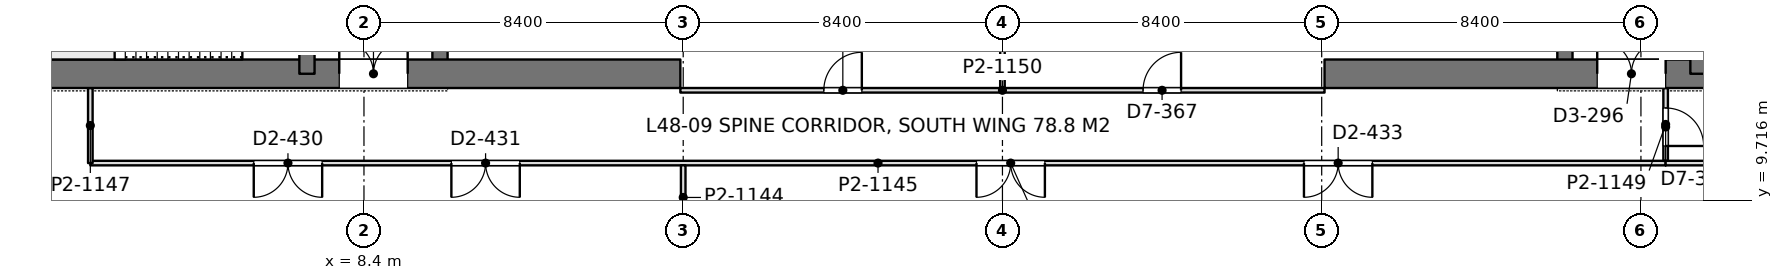
"""IFC4 building model, lengths in metres.
Left out: names, types, materials, properties, quantities, classifications, styles, units other than length and angle.
Written with IfcOpenShell. Run it as: python <this file> out.ifc"""

import sys

from ifc_helpers import new_model, si_unit, direction, frame, frame_2d, origin, place, context, subcontext, project, spatial, rectangle, extrude, element, fill, save


model = new_model("IFC4")
c1 = context("Model", 3, precision=1e-05, world=origin(), true_north=direction((0.0, 1.0)))
c2 = subcontext(c1, "Body", "Model", "MODEL_VIEW")
j1 = project(units=[si_unit("LENGTHUNIT", "METRE"), si_unit("PLANEANGLEUNIT", "RADIAN")], contexts=[c1])
p1 = place(None, origin())
s1 = spatial("IfcSite", under=j1, at=p1, CompositionType="ELEMENT")
p2 = place(p1, origin())
s2 = spatial("IfcBuilding", under=s1, at=p2, CompositionType="ELEMENT")
p3 = place(p2, frame((0.0, 0.0, 211.2)))
s3 = spatial("IfcBuildingStorey", under=s2, at=p3, CompositionType="ELEMENT", Elevation=211.2)
p4 = place(p3, frame((-1.125, 13.05, 0.0), z_axis=(0.0, 0.0, 1.0), x_axis=(1.0, 0.0, 0.0)))
e1 = element("IfcWall", 1, at=p4, inside=s3, PredefinedType="SHEAR", context=c2, shape_type="SweptSolid", body=[
    extrude(rectangle(XDim=17.85, YDim=0.75, at=frame_2d((8.925, 0.0))), origin(), (0.0, 0.0, 1.0), 4.2),
])
p5 = place(p4, frame((8.875, 0.0, 0.0)))
e2 = element("IfcOpeningElement", 2, at=p5, cuts=e1, PredefinedType="OPENING", context=c2, shape_type="SweptSolid", body=[
    extrude(rectangle(XDim=1.8, YDim=2.4, at=frame_2d((0.9, 1.2))), frame((0.0, 0.385, 0.0), z_axis=(0.0, -1.0, 0.0), x_axis=(1.0, 0.0, 0.0)), (0.0, 0.0, 1.0), 0.77),
])
p6 = place(p3, frame((6.9, 13.05, 0.0), z_axis=(0.0, 0.0, 1.0), x_axis=(0.0, 1.0, 0.0)))
e3 = element("IfcWall", 3, at=p6, inside=s3, PredefinedType="SHEAR", context=c2, shape_type="SweptSolid", body=[
    extrude(rectangle(XDim=24.3, YDim=0.4, at=frame_2d((12.15, 0.0))), origin(), (0.0, 0.0, 1.0), 4.2),
])
p7 = place(p6, frame((1.3, 0.0, 0.0)))
e4 = element("IfcOpeningElement", 4, at=p7, cuts=e3, PredefinedType="OPENING", context=c2, shape_type="SweptSolid", body=[
    extrude(rectangle(XDim=1.0, YDim=2.2, at=frame_2d((0.5, 1.1))), frame((0.0, 0.21, 0.0), z_axis=(0.0, -1.0, 0.0), x_axis=(1.0, 0.0, 0.0)), (0.0, 0.0, 1.0), 0.42),
])
p8 = place(p6, frame((22.0, 0.0, 0.0)))
e5 = element("IfcOpeningElement", 5, at=p8, cuts=e3, PredefinedType="OPENING", context=c2, shape_type="SweptSolid", body=[
    extrude(rectangle(XDim=1.0, YDim=2.2, at=frame_2d((0.5, 1.1))), frame((0.0, 0.21, 0.0), z_axis=(0.0, -1.0, 0.0), x_axis=(1.0, 0.0, 0.0)), (0.0, 0.0, 1.0), 0.42),
])
p9 = place(p6, frame((5.55, 0.0, 0.0)))
e6 = element("IfcOpeningElement", 6, at=p9, cuts=e3, PredefinedType="OPENING", context=c2, shape_type="SweptSolid", body=[
    extrude(rectangle(XDim=1.0, YDim=2.2, at=frame_2d((0.5, 1.1))), frame((0.0, 0.21, 0.0), z_axis=(0.0, -1.0, 0.0), x_axis=(1.0, 0.0, 0.0)), (0.0, 0.0, 1.0), 0.42),
])
p10 = place(p6, frame((9.55, 0.0, 0.0)))
e7 = element("IfcOpeningElement", 7, at=p10, cuts=e3, PredefinedType="OPENING", context=c2, shape_type="SweptSolid", body=[
    extrude(rectangle(XDim=1.0, YDim=2.2, at=frame_2d((0.5, 1.1))), frame((0.0, 0.21, 0.0), z_axis=(0.0, -1.0, 0.0), x_axis=(1.0, 0.0, 0.0)), (0.0, 0.0, 1.0), 0.42),
])
p11 = place(p6, frame((12.8, 0.0, 0.0)))
e8 = element("IfcOpeningElement", 8, at=p11, cuts=e3, PredefinedType="OPENING", context=c2, shape_type="SweptSolid", body=[
    extrude(rectangle(XDim=1.1, YDim=2.2, at=frame_2d((0.55, 1.1))), frame((0.0, 0.21, 0.0), z_axis=(0.0, -1.0, 0.0), x_axis=(1.0, 0.0, 0.0)), (0.0, 0.0, 1.0), 0.42),
])
p12 = place(p6, frame((15.538, 0.0, 0.0)))
e9 = element("IfcOpeningElement", 9, at=p12, cuts=e3, PredefinedType="OPENING", context=c2, shape_type="SweptSolid", body=[
    extrude(rectangle(XDim=1.1, YDim=2.2, at=frame_2d((0.55, 1.1))), frame((0.0, 0.21, 0.0), z_axis=(0.0, -1.0, 0.0), x_axis=(1.0, 0.0, 0.0)), (0.0, 0.0, 1.0), 0.42),
])
p13 = place(p6, frame((18.262, 0.0, 0.0)))
e10 = element("IfcOpeningElement", 10, at=p13, cuts=e3, PredefinedType="OPENING", context=c2, shape_type="SweptSolid", body=[
    extrude(rectangle(XDim=1.1, YDim=2.2, at=frame_2d((0.55, 1.1))), frame((0.0, 0.21, 0.0), z_axis=(0.0, -1.0, 0.0), x_axis=(1.0, 0.0, 0.0)), (0.0, 0.0, 1.0), 0.42),
])
p14 = place(p3, frame((10.4, 13.05, 0.0), z_axis=(0.0, 0.0, 1.0), x_axis=(0.0, 1.0, 0.0)))
e11 = element("IfcWall", 11, at=p14, inside=s3, PredefinedType="SHEAR", context=c2, shape_type="SweptSolid", body=[
    extrude(rectangle(XDim=24.3, YDim=0.4, at=frame_2d((12.15, 0.0))), origin(), (0.0, 0.0, 1.0), 4.2),
])
p15 = place(p14, frame((15.75, 0.0, 0.0)))
e12 = element("IfcOpeningElement", 12, at=p15, cuts=e11, PredefinedType="OPENING", context=c2, shape_type="SweptSolid", body=[
    extrude(rectangle(XDim=1.1, YDim=2.2, at=frame_2d((0.55, 1.1))), frame((0.0, 0.21, 0.0), z_axis=(0.0, -1.0, 0.0), x_axis=(1.0, 0.0, 0.0)), (0.0, 0.0, 1.0), 0.42),
])
p16 = place(p14, frame((18.6, 0.0, 0.0)))
e13 = element("IfcOpeningElement", 13, at=p16, cuts=e11, PredefinedType="OPENING", context=c2, shape_type="SweptSolid", body=[
    extrude(rectangle(XDim=1.1, YDim=2.2, at=frame_2d((0.55, 1.1))), frame((0.0, 0.21, 0.0), z_axis=(0.0, -1.0, 0.0), x_axis=(1.0, 0.0, 0.0)), (0.0, 0.0, 1.0), 0.42),
])
p17 = place(p14, frame((21.45, 0.0, 0.0)))
e14 = element("IfcOpeningElement", 14, at=p17, cuts=e11, PredefinedType="OPENING", context=c2, shape_type="SweptSolid", body=[
    extrude(rectangle(XDim=1.1, YDim=2.2, at=frame_2d((0.55, 1.1))), frame((0.0, 0.21, 0.0), z_axis=(0.0, -1.0, 0.0), x_axis=(1.0, 0.0, 0.0)), (0.0, 0.0, 1.0), 0.42),
])
p18 = place(p14, frame((6.05, 0.0, 0.0)))
e15 = element("IfcOpeningElement", 15, at=p18, cuts=e11, PredefinedType="OPENING", context=c2, shape_type="SweptSolid", body=[
    extrude(rectangle(XDim=1.8, YDim=2.4, at=frame_2d((0.9, 1.2))), frame((0.0, 0.21, 0.0), z_axis=(0.0, -1.0, 0.0), x_axis=(1.0, 0.0, 0.0)), (0.0, 0.0, 1.0), 0.42),
])
p19 = place(p14, frame((11.25, 0.0, 0.0)))
e16 = element("IfcOpeningElement", 16, at=p19, cuts=e11, PredefinedType="OPENING", context=c2, shape_type="SweptSolid", body=[
    extrude(rectangle(XDim=1.8, YDim=2.4, at=frame_2d((0.9, 1.2))), frame((0.0, 0.21, 0.0), z_axis=(0.0, -1.0, 0.0), x_axis=(1.0, 0.0, 0.0)), (0.0, 0.0, 1.0), 0.42),
])
p20 = place(p3, frame((33.675, 13.05, 0.0), z_axis=(0.0, 0.0, 1.0), x_axis=(1.0, 0.0, 0.0)))
e17 = element("IfcWall", 17, at=p20, inside=s3, PredefinedType="SHEAR", context=c2, shape_type="SweptSolid", body=[
    extrude(rectangle(XDim=17.85, YDim=0.75, at=frame_2d((8.925, 0.0))), origin(), (0.0, 0.0, 1.0), 4.2),
])
p21 = place(p20, frame((7.175, 0.0, 0.0)))
e18 = element("IfcOpeningElement", 18, at=p21, cuts=e17, PredefinedType="OPENING", context=c2, shape_type="SweptSolid", body=[
    extrude(rectangle(XDim=1.8, YDim=2.4, at=frame_2d((0.9, 1.2))), frame((0.0, 0.385, 0.0), z_axis=(0.0, -1.0, 0.0), x_axis=(1.0, 0.0, 0.0)), (0.0, 0.0, 1.0), 0.77),
])
p22 = place(p3, frame((43.5, 13.05, 0.0), z_axis=(0.0, 0.0, 1.0), x_axis=(0.0, 1.0, 0.0)))
e19 = element("IfcWall", 19, at=p22, inside=s3, PredefinedType="SHEAR", context=c2, shape_type="SweptSolid", body=[
    extrude(rectangle(XDim=24.3, YDim=0.4, at=frame_2d((12.15, 0.0))), origin(), (0.0, 0.0, 1.0), 4.2),
])
p23 = place(p22, frame((1.3, 0.0, 0.0)))
e20 = element("IfcOpeningElement", 20, at=p23, cuts=e19, PredefinedType="OPENING", context=c2, shape_type="SweptSolid", body=[
    extrude(rectangle(XDim=1.0, YDim=2.2, at=frame_2d((0.5, 1.1))), frame((0.0, 0.21, 0.0), z_axis=(0.0, -1.0, 0.0), x_axis=(1.0, 0.0, 0.0)), (0.0, 0.0, 1.0), 0.42),
])
p24 = place(p22, frame((22.0, 0.0, 0.0)))
e21 = element("IfcOpeningElement", 21, at=p24, cuts=e19, PredefinedType="OPENING", context=c2, shape_type="SweptSolid", body=[
    extrude(rectangle(XDim=1.0, YDim=2.2, at=frame_2d((0.5, 1.1))), frame((0.0, 0.21, 0.0), z_axis=(0.0, -1.0, 0.0), x_axis=(1.0, 0.0, 0.0)), (0.0, 0.0, 1.0), 0.42),
])
p25 = place(p22, frame((5.55, 0.0, 0.0)))
e22 = element("IfcOpeningElement", 22, at=p25, cuts=e19, PredefinedType="OPENING", context=c2, shape_type="SweptSolid", body=[
    extrude(rectangle(XDim=1.0, YDim=2.2, at=frame_2d((0.5, 1.1))), frame((0.0, 0.21, 0.0), z_axis=(0.0, -1.0, 0.0), x_axis=(1.0, 0.0, 0.0)), (0.0, 0.0, 1.0), 0.42),
])
p26 = place(p22, frame((9.55, 0.0, 0.0)))
e23 = element("IfcOpeningElement", 23, at=p26, cuts=e19, PredefinedType="OPENING", context=c2, shape_type="SweptSolid", body=[
    extrude(rectangle(XDim=1.0, YDim=2.2, at=frame_2d((0.5, 1.1))), frame((0.0, 0.21, 0.0), z_axis=(0.0, -1.0, 0.0), x_axis=(1.0, 0.0, 0.0)), (0.0, 0.0, 1.0), 0.42),
])
p27 = place(p22, frame((12.8, 0.0, 0.0)))
e24 = element("IfcOpeningElement", 24, at=p27, cuts=e19, PredefinedType="OPENING", context=c2, shape_type="SweptSolid", body=[
    extrude(rectangle(XDim=1.1, YDim=2.2, at=frame_2d((0.55, 1.1))), frame((0.0, 0.21, 0.0), z_axis=(0.0, -1.0, 0.0), x_axis=(1.0, 0.0, 0.0)), (0.0, 0.0, 1.0), 0.42),
])
p28 = place(p22, frame((15.538, 0.0, 0.0)))
e25 = element("IfcOpeningElement", 25, at=p28, cuts=e19, PredefinedType="OPENING", context=c2, shape_type="SweptSolid", body=[
    extrude(rectangle(XDim=1.1, YDim=2.2, at=frame_2d((0.55, 1.1))), frame((0.0, 0.21, 0.0), z_axis=(0.0, -1.0, 0.0), x_axis=(1.0, 0.0, 0.0)), (0.0, 0.0, 1.0), 0.42),
])
p29 = place(p22, frame((18.262, 0.0, 0.0)))
e26 = element("IfcOpeningElement", 26, at=p29, cuts=e19, PredefinedType="OPENING", context=c2, shape_type="SweptSolid", body=[
    extrude(rectangle(XDim=1.1, YDim=2.2, at=frame_2d((0.55, 1.1))), frame((0.0, 0.21, 0.0), z_axis=(0.0, -1.0, 0.0), x_axis=(1.0, 0.0, 0.0)), (0.0, 0.0, 1.0), 0.42),
])
p30 = place(p3, frame((40.0, 13.05, 0.0), z_axis=(0.0, 0.0, 1.0), x_axis=(0.0, 1.0, 0.0)))
e27 = element("IfcWall", 27, at=p30, inside=s3, PredefinedType="SHEAR", context=c2, shape_type="SweptSolid", body=[
    extrude(rectangle(XDim=24.3, YDim=0.4, at=frame_2d((12.15, 0.0))), origin(), (0.0, 0.0, 1.0), 4.2),
])
p31 = place(p30, frame((15.75, 0.0, 0.0)))
e28 = element("IfcOpeningElement", 28, at=p31, cuts=e27, PredefinedType="OPENING", context=c2, shape_type="SweptSolid", body=[
    extrude(rectangle(XDim=1.1, YDim=2.2, at=frame_2d((0.55, 1.1))), frame((0.0, 0.21, 0.0), z_axis=(0.0, -1.0, 0.0), x_axis=(1.0, 0.0, 0.0)), (0.0, 0.0, 1.0), 0.42),
])
p32 = place(p30, frame((18.6, 0.0, 0.0)))
e29 = element("IfcOpeningElement", 29, at=p32, cuts=e27, PredefinedType="OPENING", context=c2, shape_type="SweptSolid", body=[
    extrude(rectangle(XDim=1.1, YDim=2.2, at=frame_2d((0.55, 1.1))), frame((0.0, 0.21, 0.0), z_axis=(0.0, -1.0, 0.0), x_axis=(1.0, 0.0, 0.0)), (0.0, 0.0, 1.0), 0.42),
])
p33 = place(p30, frame((21.45, 0.0, 0.0)))
e30 = element("IfcOpeningElement", 30, at=p33, cuts=e27, PredefinedType="OPENING", context=c2, shape_type="SweptSolid", body=[
    extrude(rectangle(XDim=1.1, YDim=2.2, at=frame_2d((0.55, 1.1))), frame((0.0, 0.21, 0.0), z_axis=(0.0, -1.0, 0.0), x_axis=(1.0, 0.0, 0.0)), (0.0, 0.0, 1.0), 0.42),
])
p34 = place(p30, frame((6.05, 0.0, 0.0)))
e31 = element("IfcOpeningElement", 31, at=p34, cuts=e27, PredefinedType="OPENING", context=c2, shape_type="SweptSolid", body=[
    extrude(rectangle(XDim=1.8, YDim=2.4, at=frame_2d((0.9, 1.2))), frame((0.0, 0.21, 0.0), z_axis=(0.0, -1.0, 0.0), x_axis=(1.0, 0.0, 0.0)), (0.0, 0.0, 1.0), 0.42),
])
p35 = place(p30, frame((11.25, 0.0, 0.0)))
e32 = element("IfcOpeningElement", 32, at=p35, cuts=e27, PredefinedType="OPENING", context=c2, shape_type="SweptSolid", body=[
    extrude(rectangle(XDim=1.8, YDim=2.4, at=frame_2d((0.9, 1.2))), frame((0.0, 0.21, 0.0), z_axis=(0.0, -1.0, 0.0), x_axis=(1.0, 0.0, 0.0)), (0.0, 0.0, 1.0), 0.42),
])
p36 = place(p3, frame((16.8, 8.949, 0.0), z_axis=(0.0, 0.0, 1.0), x_axis=(0.0, 1.0, 0.0)))
e33 = element("IfcWall", 33, at=p36, inside=s3, PredefinedType="PARTITIONING", context=c2, shape_type="SweptSolid", body=[
    extrude(rectangle(XDim=1.693, YDim=0.12, at=frame_2d((0.847, 0.0))), origin(), (0.0, 0.0, 1.0), 3.69),
])
p37 = place(p3, frame((1.2, 10.7, 0.0), z_axis=(0.0, 0.0, 1.0), x_axis=(1.0, 0.0, 0.0)))
e34 = element("IfcWall", 34, at=p37, inside=s3, PredefinedType="PARTITIONING", context=c2, shape_type="SweptSolid", body=[
    extrude(rectangle(XDim=41.452, YDim=0.12, at=frame_2d((20.726, 0.0))), origin(), (0.0, 0.0, 1.0), 3.55),
])
p38 = place(p37, frame((4.3, 0.0, 0.0)))
e35 = element("IfcOpeningElement", 35, at=p38, cuts=e34, PredefinedType="OPENING", context=c2, shape_type="SweptSolid", body=[
    extrude(rectangle(XDim=1.8, YDim=2.2, at=frame_2d((0.9, 1.1))), frame((0.0, 0.07, 0.0), z_axis=(0.0, -1.0, 0.0), x_axis=(1.0, 0.0, 0.0)), (0.0, 0.0, 1.0), 0.14),
])
p39 = place(p37, frame((9.5, 0.0, 0.0)))
e36 = element("IfcOpeningElement", 36, at=p39, cuts=e34, PredefinedType="OPENING", context=c2, shape_type="SweptSolid", body=[
    extrude(rectangle(XDim=1.8, YDim=2.2, at=frame_2d((0.9, 1.1))), frame((0.0, 0.07, 0.0), z_axis=(0.0, -1.0, 0.0), x_axis=(1.0, 0.0, 0.0)), (0.0, 0.0, 1.0), 0.14),
])
p40 = place(p37, frame((23.317, 0.0, 0.0)))
e37 = element("IfcOpeningElement", 37, at=p40, cuts=e34, PredefinedType="OPENING", context=c2, shape_type="SweptSolid", body=[
    extrude(rectangle(XDim=1.8, YDim=2.2, at=frame_2d((0.9, 1.1))), frame((0.0, 0.07, 0.0), z_axis=(0.0, -1.0, 0.0), x_axis=(1.0, 0.0, 0.0)), (0.0, 0.0, 1.0), 0.14),
])
p41 = place(p37, frame((31.933, 0.0, 0.0)))
e38 = element("IfcOpeningElement", 38, at=p41, cuts=e34, PredefinedType="OPENING", context=c2, shape_type="SweptSolid", body=[
    extrude(rectangle(XDim=1.8, YDim=2.2, at=frame_2d((0.9, 1.1))), frame((0.0, 0.07, 0.0), z_axis=(0.0, -1.0, 0.0), x_axis=(1.0, 0.0, 0.0)), (0.0, 0.0, 1.0), 0.14),
])
p42 = place(p3, frame((1.2, 10.7, 0.0), z_axis=(0.0, 0.0, 1.0), x_axis=(0.0, 1.0, 0.0)))
e39 = element("IfcWall", 39, at=p42, inside=s3, PredefinedType="PARTITIONING", context=c2, shape_type="SweptSolid", body=[
    extrude(rectangle(XDim=1.976, YDim=0.12, at=frame_2d((0.988, 0.0))), origin(), (0.0, 0.0, 1.0), 4.05),
])
p43 = place(p3, frame((42.65, 10.758, 0.0), z_axis=(0.0, 0.0, 1.0), x_axis=(0.0, 1.0, 0.0)))
e40 = element("IfcWall", 40, at=p43, inside=s3, PredefinedType="PARTITIONING", context=c2, shape_type="SweptSolid", body=[
    extrude(rectangle(XDim=1.918, YDim=0.12, at=frame_2d((0.959, 0.0))), origin(), (0.0, 0.0, 1.0), 4.05),
])
p44 = place(p43, frame((0.392, 0.0, 0.0)))
e41 = element("IfcOpeningElement", 41, at=p44, cuts=e40, PredefinedType="OPENING", context=c2, shape_type="SweptSolid", body=[
    extrude(rectangle(XDim=1.0, YDim=2.4, at=frame_2d((0.5, 1.2))), frame((0.0, 0.07, 0.0), z_axis=(0.0, -1.0, 0.0), x_axis=(1.0, 0.0, 0.0)), (0.0, 0.0, 1.0), 0.14),
])
p45 = place(p3, frame((42.648, 10.7, 0.0), z_axis=(0.0, 0.0, 1.0), x_axis=(1.0, 0.0, 0.0)))
e42 = element("IfcWall", 42, at=p45, inside=s3, PredefinedType="PARTITIONING", context=c2, shape_type="SweptSolid", body=[
    extrude(rectangle(XDim=6.552, YDim=0.12, at=frame_2d((3.276, 0.0))), origin(), (0.0, 0.0, 1.0), 4.05),
])
p46 = place(p3, frame((25.2, 12.658, 0.0), z_axis=(0.0, 0.0, 1.0), x_axis=(0.0, 1.0, 0.0)))
e43 = element("IfcWall", 43, at=p46, inside=s3, PredefinedType="PARTITIONING", context=c2, shape_type="SweptSolid", body=[
    extrude(rectangle(XDim=3.593, YDim=0.12, at=frame_2d((1.796, 0.0))), origin(), (0.0, 0.0, 1.0), 3.55),
])
p47 = place(p3, frame((16.725, 12.615, 0.0), z_axis=(0.0, 0.0, 1.0), x_axis=(1.0, 0.0, 0.0)))
e44 = element("IfcWall", 44, at=p47, inside=s3, PredefinedType="PARTITIONING", context=c2, shape_type="SweptSolid", body=[
    extrude(rectangle(XDim=16.95, YDim=0.12, at=frame_2d((8.475, 0.0))), origin(), (0.0, 0.0, 1.0), 3.55),
])
p48 = place(p47, frame((3.775, 0.0, 0.0)))
e45 = element("IfcOpeningElement", 45, at=p48, cuts=e44, PredefinedType="OPENING", context=c2, shape_type="SweptSolid", body=[
    extrude(rectangle(XDim=1.0, YDim=2.4, at=frame_2d((0.5, 1.2))), frame((0.0, 0.07, 0.0), z_axis=(0.0, -1.0, 0.0), x_axis=(1.0, 0.0, 0.0)), (0.0, 0.0, 1.0), 0.14),
])
p49 = place(p47, frame((12.175, 0.0, 0.0)))
e46 = element("IfcOpeningElement", 46, at=p49, cuts=e44, PredefinedType="OPENING", context=c2, shape_type="SweptSolid", body=[
    extrude(rectangle(XDim=1.0, YDim=2.4, at=frame_2d((0.5, 1.2))), frame((0.0, 0.07, 0.0), z_axis=(0.0, -1.0, 0.0), x_axis=(1.0, 0.0, 0.0)), (0.0, 0.0, 1.0), 0.14),
])
p50 = place(p5, origin())
e47 = element("IfcDoor", 47, at=p50, inside=s3, OperationType="DOUBLE_DOOR_SINGLE_SWING", PredefinedType="DOOR", context=c2, shape_type="SweptSolid", body=[
    extrude(rectangle(XDim=1.8, YDim=2.4, at=frame_2d((0.9, 1.2))), frame((0.0, 0.025, 0.0), z_axis=(0.0, -1.0, 0.0), x_axis=(1.0, 0.0, 0.0)), (0.0, 0.0, 1.0), 0.05),
])
fill(e2, e47)
p51 = place(p21, origin())
e48 = element("IfcDoor", 48, at=p51, inside=s3, OperationType="DOUBLE_DOOR_SINGLE_SWING", PredefinedType="DOOR", context=c2, shape_type="SweptSolid", body=[
    extrude(rectangle(XDim=1.8, YDim=2.4, at=frame_2d((0.9, 1.2))), frame((0.0, 0.025, 0.0), z_axis=(0.0, -1.0, 0.0), x_axis=(1.0, 0.0, 0.0)), (0.0, 0.0, 1.0), 0.05),
])
fill(e18, e48)
p52 = place(p38, frame((1.8, 0.0, 0.0), z_axis=(0.0, 0.0, 1.0), x_axis=(-1.0, 0.0, 0.0)))
e49 = element("IfcDoor", 49, at=p52, inside=s3, OperationType="DOUBLE_DOOR_SINGLE_SWING", PredefinedType="DOOR", context=c2, shape_type="SweptSolid", body=[
    extrude(rectangle(XDim=1.8, YDim=2.2, at=frame_2d((0.9, 1.1))), frame((0.0, 0.025, 0.0), z_axis=(0.0, -1.0, 0.0), x_axis=(1.0, 0.0, 0.0)), (0.0, 0.0, 1.0), 0.05),
])
fill(e35, e49)
p53 = place(p39, frame((1.8, 0.0, 0.0), z_axis=(0.0, 0.0, 1.0), x_axis=(-1.0, 0.0, 0.0)))
e50 = element("IfcDoor", 50, at=p53, inside=s3, OperationType="DOUBLE_DOOR_SINGLE_SWING", PredefinedType="DOOR", context=c2, shape_type="SweptSolid", body=[
    extrude(rectangle(XDim=1.8, YDim=2.2, at=frame_2d((0.9, 1.1))), frame((0.0, 0.025, 0.0), z_axis=(0.0, -1.0, 0.0), x_axis=(1.0, 0.0, 0.0)), (0.0, 0.0, 1.0), 0.05),
])
fill(e36, e50)
p54 = place(p40, frame((1.8, 0.0, 0.0), z_axis=(0.0, 0.0, 1.0), x_axis=(-1.0, 0.0, 0.0)))
e51 = element("IfcDoor", 51, at=p54, inside=s3, OperationType="DOUBLE_DOOR_SINGLE_SWING", PredefinedType="DOOR", context=c2, shape_type="SweptSolid", body=[
    extrude(rectangle(XDim=1.8, YDim=2.2, at=frame_2d((0.9, 1.1))), frame((0.0, 0.025, 0.0), z_axis=(0.0, -1.0, 0.0), x_axis=(1.0, 0.0, 0.0)), (0.0, 0.0, 1.0), 0.05),
])
fill(e37, e51)
p55 = place(p41, frame((1.8, 0.0, 0.0), z_axis=(0.0, 0.0, 1.0), x_axis=(-1.0, 0.0, 0.0)))
e52 = element("IfcDoor", 52, at=p55, inside=s3, OperationType="DOUBLE_DOOR_SINGLE_SWING", PredefinedType="DOOR", context=c2, shape_type="SweptSolid", body=[
    extrude(rectangle(XDim=1.8, YDim=2.2, at=frame_2d((0.9, 1.1))), frame((0.0, 0.025, 0.0), z_axis=(0.0, -1.0, 0.0), x_axis=(1.0, 0.0, 0.0)), (0.0, 0.0, 1.0), 0.05),
])
fill(e38, e52)
p56 = place(p44, frame((1.0, 0.0, 0.0), z_axis=(0.0, 0.0, 1.0), x_axis=(-1.0, 0.0, 0.0)))
e53 = element("IfcDoor", 53, at=p56, inside=s3, OperationType="SINGLE_SWING_RIGHT", PredefinedType="DOOR", context=c2, shape_type="SweptSolid", body=[
    extrude(rectangle(XDim=1.0, YDim=2.4, at=frame_2d((0.5, 1.2))), frame((0.0, 0.025, 0.0), z_axis=(0.0, -1.0, 0.0), x_axis=(1.0, 0.0, 0.0)), (0.0, 0.0, 1.0), 0.05),
])
fill(e41, e53)
p57 = place(p48, origin())
e54 = element("IfcDoor", 54, at=p57, inside=s3, OperationType="SINGLE_SWING_RIGHT", PredefinedType="DOOR", context=c2, shape_type="SweptSolid", body=[
    extrude(rectangle(XDim=1.0, YDim=2.4, at=frame_2d((0.5, 1.2))), frame((0.0, 0.025, 0.0), z_axis=(0.0, -1.0, 0.0), x_axis=(1.0, 0.0, 0.0)), (0.0, 0.0, 1.0), 0.05),
])
fill(e45, e54)
p58 = place(p49, origin())
e55 = element("IfcDoor", 55, at=p58, inside=s3, OperationType="SINGLE_SWING_RIGHT", PredefinedType="DOOR", context=c2, shape_type="SweptSolid", body=[
    extrude(rectangle(XDim=1.0, YDim=2.4, at=frame_2d((0.5, 1.2))), frame((0.0, 0.025, 0.0), z_axis=(0.0, -1.0, 0.0), x_axis=(1.0, 0.0, 0.0)), (0.0, 0.0, 1.0), 0.05),
])
fill(e46, e55)
save(model, sys.argv[1])
